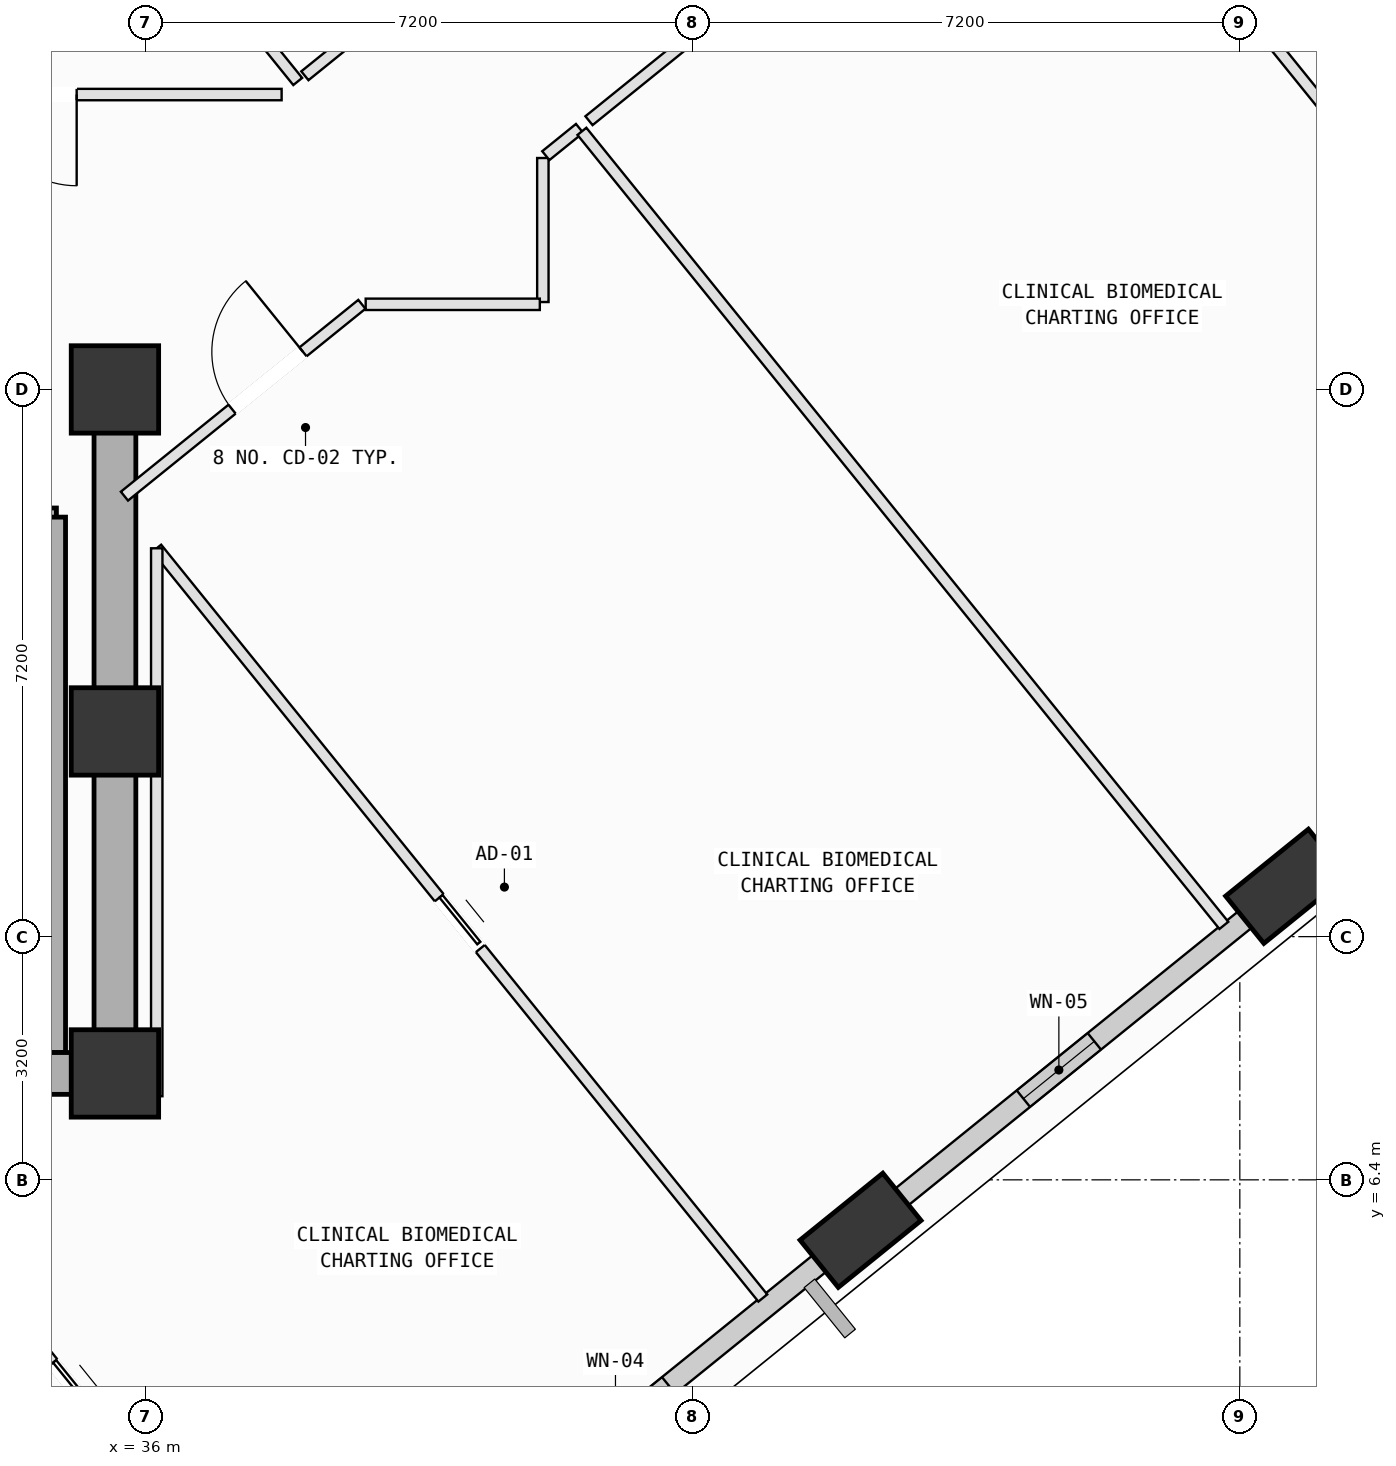
"""IFC4 building model, lengths in metres.
Left out: names, types, materials, properties, quantities, classifications, styles, units other than length and angle.
Written with IfcOpenShell. Run it as: python <this file> out.ifc"""

import sys

from ifc_helpers import new_model, si_unit, direction, frame, frame_2d, origin, origin_2d, place, context, subcontext, project, spatial, rectangle, extrude, element, fill, save


model = new_model("IFC4")
c1 = context("Model", 3, precision=1e-05, world=origin(), true_north=direction((0.0, 1.0)))
c2 = subcontext(c1, "Body", "Model", "MODEL_VIEW")
j1 = project(units=[si_unit("LENGTHUNIT", "METRE"), si_unit("PLANEANGLEUNIT", "RADIAN")], contexts=[c1])
p1 = place(None, origin())
s1 = spatial("IfcSite", under=j1, at=p1, CompositionType="ELEMENT")
p2 = place(p1, origin())
s2 = spatial("IfcBuilding", under=s1, at=p2, CompositionType="ELEMENT")
p3 = place(p2, frame((0.0, 0.0, 189.8)))
s3 = spatial("IfcBuildingStorey", under=s2, at=p3, CompositionType="ELEMENT", Elevation=189.8)
for number, where, z_axis, x_axis in (
    (1, (35.6, 7.8, 0.0), (0.0, 0.0, 1.0), (1.0, 0.0, 0.0)),
    (2, (35.6, 12.3, 0.0), (0.0, 0.0, 1.0), (1.0, 0.0, 0.0)),
    (3, (35.6, 16.8, 0.0), (0.0, 0.0, 1.0), (1.0, 0.0, 0.0)),
):
    element("IfcColumn", number, at=place(p3, frame(where, z_axis=z_axis, x_axis=x_axis)), inside=s3, PredefinedType="COLUMN", context=c2, shape_type="SweptSolid", body=[
        extrude(rectangle(XDim=1.15, YDim=1.15, at=origin_2d()), origin(), (0.0, 0.0, 1.0), 4.0),
    ])
p4 = place(p3, frame((45.41, 5.736, 0.002), z_axis=(0.078286659475, 0.049392981735, 0.995706549292), x_axis=(-0.944360032842, 0.323725114048, 0.058190883356)))
e4 = element("IfcColumn", 4, at=p4, inside=s3, PredefinedType="COLUMN", context=c2, shape_type="SweptSolid", body=[
    extrude(rectangle(XDim=1.4, YDim=0.8, at=origin_2d()), origin(), (0.0, 0.0, 1.0), 4.014),
])
p5 = place(p3, frame((51.009, 10.262, 0.002), z_axis=(0.059363348955, 0.072318669987, 0.995613380169), x_axis=(-0.998222050572, 0.009656049796, 0.058817501262)))
e5 = element("IfcColumn", 5, at=p5, inside=s3, PredefinedType="COLUMN", context=c2, shape_type="SweptSolid", body=[
    extrude(rectangle(XDim=1.4, YDim=0.8, at=origin_2d()), origin(), (0.0, 0.0, 1.0), 4.014),
])
p6 = place(p3, frame((45.168, 5.541, 0.0), z_axis=(0.0, 0.0, 1.0), x_axis=(-0.777696638223, -0.628639752877, 0.0)))
e6 = element("IfcWall", 6, at=p6, inside=s3, PredefinedType="SOLIDWALL", context=c2, shape_type="SweptSolid", body=[
    extrude(rectangle(XDim=6.214, YDim=0.28, at=frame_2d((3.107, 0.0))), origin(), (0.0, 0.0, 1.0), 3.265),
])
p7 = place(p6, frame((2.935, 0.0, 0.75)))
e7 = element("IfcOpeningElement", 7, at=p7, cuts=e6, PredefinedType="OPENING", context=c2, shape_type="SweptSolid", body=[
    extrude(rectangle(XDim=1.8, YDim=2.05, at=frame_2d((0.9, 1.025))), frame((0.0, 0.15, 0.0), z_axis=(0.0, -1.0, 0.0), x_axis=(1.0, 0.0, 0.0)), (0.0, 0.0, 1.0), 0.3),
])
p8 = place(p3, frame((50.768, 10.067, 0.0), z_axis=(0.0, 0.0, 1.0), x_axis=(-0.777701603698, -0.628633609987, 0.0)))
e8 = element("IfcWall", 8, at=p8, inside=s3, PredefinedType="SOLIDWALL", context=c2, shape_type="SweptSolid", body=[
    extrude(rectangle(XDim=6.209, YDim=0.28, at=frame_2d((3.104, 0.0))), origin(), (0.0, 0.0, 1.0), 3.265),
])
p9 = place(p8, frame((2.934, 0.0, 0.75)))
e9 = element("IfcOpeningElement", 9, at=p9, cuts=e8, PredefinedType="OPENING", context=c2, shape_type="SweptSolid", body=[
    extrude(rectangle(XDim=1.2, YDim=1.75, at=frame_2d((0.6, 0.875))), frame((0.0, 0.15, 0.0), z_axis=(0.0, -1.0, 0.0), x_axis=(1.0, 0.0, 0.0)), (0.0, 0.0, 1.0), 0.3),
])
p10 = place(p3, frame((31.37, 15.12, 0.0), z_axis=(0.0, 0.0, 1.0), x_axis=(1.0, 0.0, 0.0)))
e10 = element("IfcWall", 10, at=p10, inside=s3, PredefinedType="SOLIDWALL", context=c2, shape_type="SweptSolid", body=[
    extrude(rectangle(XDim=3.46, YDim=0.24, at=frame_2d((1.73, 0.0))), origin(), (0.0, 0.0, 1.0), 3.78),
])
p11 = place(p10, frame((2.14, 0.0, 0.0)))
e11 = element("IfcOpeningElement", 11, at=p11, cuts=e10, PredefinedType="OPENING", context=c2, shape_type="SweptSolid", body=[
    extrude(rectangle(XDim=1.1, YDim=2.15, at=frame_2d((0.55, 1.075))), frame((0.0, 0.13, 0.0), z_axis=(0.0, -1.0, 0.0), x_axis=(1.0, 0.0, 0.0)), (0.0, 0.0, 1.0), 0.26),
])
p12 = place(p3, frame((34.83, 15.12, 0.0), z_axis=(0.0, 0.0, 1.0), x_axis=(0.0, -1.0, 0.0)))
e12 = element("IfcWall", 12, at=p12, inside=s3, PredefinedType="SOLIDWALL", context=c2, shape_type="SweptSolid", body=[
    extrude(rectangle(XDim=7.045, YDim=0.24, at=frame_2d((3.522, 0.0))), origin(), (0.0, 0.0, 1.0), 3.78),
])
p13 = place(p3, frame((24.8, 7.8, 0.0), z_axis=(0.0, 0.0, 1.0), x_axis=(1.0, 0.0, 0.0)))
e13 = element("IfcWall", 13, at=p13, inside=s3, PredefinedType="SHEAR", context=c2, shape_type="SweptSolid", body=[
    extrude(rectangle(XDim=10.8, YDim=0.55, at=frame_2d((5.4, 0.0))), origin(), (0.0, 0.0, 1.0), 3.78),
])
p14 = place(p3, frame((35.6, 7.8, 0.0), z_axis=(0.0, 0.0, 1.0), x_axis=(0.0, 1.0, 0.0)))
e14 = element("IfcWall", 14, at=p14, inside=s3, PredefinedType="SHEAR", context=c2, shape_type="SweptSolid", body=[
    extrude(rectangle(XDim=9.0, YDim=0.55, at=frame_2d((4.5, 0.0))), origin(), (0.0, 0.0, 1.0), 3.78),
])
p15 = place(p3, frame((31.807, 7.675, 0.0), z_axis=(0.0, 0.0, 1.0), x_axis=(0.628606219848, -0.777723742963, 0.0)))
e15 = element("IfcWall", 15, at=p15, inside=s3, PredefinedType="PARTITIONING", context=c2, shape_type="SweptSolid", body=[
    extrude(rectangle(XDim=9.945, YDim=0.15, at=frame_2d((4.972, 0.0))), origin(), (0.0, 0.0, 1.0), 3.78),
])
p16 = place(p15, frame((4.736, 0.0, 0.0)))
e16 = element("IfcOpeningElement", 16, at=p16, cuts=e15, PredefinedType="OPENING", context=c2, shape_type="SweptSolid", body=[
    extrude(rectangle(XDim=0.86, YDim=2.06, at=frame_2d((0.43, 1.03))), frame((0.0, 0.085, 0.0), z_axis=(0.0, -1.0, 0.0), x_axis=(1.0, 0.0, 0.0)), (0.0, 0.0, 1.0), 0.17),
])
p17 = place(p3, frame((36.15, 14.71, 0.0), z_axis=(0.0, 0.0, 1.0), x_axis=(0.628634979592, -0.777700496613, 0.0)))
e17 = element("IfcWall", 17, at=p17, inside=s3, PredefinedType="PARTITIONING", context=c2, shape_type="SweptSolid", body=[
    extrude(rectangle(XDim=12.685, YDim=0.15, at=frame_2d((6.342, 0.0))), origin(), (0.0, 0.0, 1.0), 3.78),
])
p18 = place(p17, frame((5.912, 0.0, 0.0)))
e18 = element("IfcOpeningElement", 18, at=p18, cuts=e17, PredefinedType="OPENING", context=c2, shape_type="SweptSolid", body=[
    extrude(rectangle(XDim=0.86, YDim=2.06, at=frame_2d((0.43, 1.03))), frame((0.0, 0.085, 0.0), z_axis=(0.0, -1.0, 0.0), x_axis=(1.0, 0.0, 0.0)), (0.0, 0.0, 1.0), 0.17),
])
p19 = place(p3, frame((35.6, 7.5, 0.0), z_axis=(0.0, 0.0, 1.0), x_axis=(1.0, 0.0, 0.0)))
e19 = element("IfcWall", 19, at=p19, inside=s3, PredefinedType="PARTITIONING", context=c2, shape_type="SweptSolid", body=[
    extrude(rectangle(XDim=0.55, YDim=0.15, at=frame_2d((0.275, 0.0))), origin(), (0.0, 0.0, 1.0), 3.78),
])
p20 = place(p3, frame((36.15, 7.5, 0.0), z_axis=(0.0, 0.0, 1.0), x_axis=(0.0, 1.0, 0.0)))
e20 = element("IfcWall", 20, at=p20, inside=s3, PredefinedType="PARTITIONING", context=c2, shape_type="SweptSolid", body=[
    extrude(rectangle(XDim=7.21, YDim=0.15, at=frame_2d((3.605, 0.0))), origin(), (0.0, 0.0, 1.0), 3.78),
])
p21 = place(p3, frame((41.23, 17.95, 0.0), z_axis=(0.0, 0.0, 1.0), x_axis=(0.0, 1.0, 0.0)))
e21 = element("IfcWall", 21, at=p21, inside=s3, PredefinedType="PARTITIONING", context=c2, shape_type="SweptSolid", body=[
    extrude(rectangle(XDim=1.895, YDim=0.15, at=frame_2d((0.948, 0.0))), origin(), (0.0, 0.0, 1.0), 3.78),
])
p22 = place(p3, frame((41.269, 19.876, 0.0), z_axis=(0.0, 0.0, 1.0), x_axis=(0.777394219276, 0.629013694475, 0.0)))
e22 = element("IfcWall", 22, at=p22, inside=s3, PredefinedType="PARTITIONING", context=c2, shape_type="SweptSolid", body=[
    extrude(rectangle(XDim=0.571, YDim=0.15, at=frame_2d((0.286, 0.0))), origin(), (0.0, 0.0, 1.0), 3.065),
])
p23 = place(p3, frame((41.744, 20.196, 0.0), z_axis=(0.0, 0.0, 1.0), x_axis=(0.628664865479, -0.777676338146, 0.0)))
e23 = element("IfcWall", 23, at=p23, inside=s3, PredefinedType="PARTITIONING", context=c2, shape_type="SweptSolid", body=[
    extrude(rectangle(XDim=13.435, YDim=0.15, at=frame_2d((6.717, 0.0))), origin(), (0.0, 0.0, 1.0), 3.78),
])
p24 = place(p3, frame((46.084, 5.985, 0.0), z_axis=(0.0, 0.0, 1.0), x_axis=(-0.777302187171, -0.629127419382, 0.0)))
e24 = element("IfcWall", 24, at=p24, inside=s3, PredefinedType="PARTITIONING", context=c2, shape_type="SweptSolid", body=[
    extrude(rectangle(XDim=0.992, YDim=0.15, at=frame_2d((0.496, 0.0))), origin(), (0.0, 0.0, 1.0), 3.265),
])
p25 = place(p3, frame((35.725, 15.396, 0.0), z_axis=(0.0, 0.0, 1.0), x_axis=(0.777858887674, 0.628438979429, 0.0)))
e25 = element("IfcWall", 25, at=p25, inside=s3, PredefinedType="PARTITIONING", context=c2, shape_type="SweptSolid", body=[
    extrude(rectangle(XDim=4.016, YDim=0.15, at=frame_2d((2.008, 0.0))), origin(), (0.0, 0.0, 1.0), 3.78),
])
p26 = place(p25, frame((1.821, 0.0, 0.0)))
e26 = element("IfcOpeningElement", 26, at=p26, cuts=e25, PredefinedType="OPENING", context=c2, shape_type="SweptSolid", body=[
    extrude(rectangle(XDim=1.2, YDim=2.15, at=frame_2d((0.6, 1.075))), frame((0.0, 0.085, 0.0), z_axis=(0.0, -1.0, 0.0), x_axis=(1.0, 0.0, 0.0)), (0.0, 0.0, 1.0), 0.17),
])
p27 = place(p3, frame((38.899, 17.92, 0.0), z_axis=(0.0, 0.0, 1.0), x_axis=(1.0, 0.0, 0.0)))
e27 = element("IfcWall", 27, at=p27, inside=s3, PredefinedType="PARTITIONING", context=c2, shape_type="SweptSolid", body=[
    extrude(rectangle(XDim=2.291, YDim=0.15, at=frame_2d((1.146, 0.0))), origin(), (0.0, 0.0, 1.0), 3.78),
])
p28 = place(p3, frame((41.837, 20.336, 0.0), z_axis=(0.0, 0.0, 1.0), x_axis=(0.777713450533, 0.628618953628, 0.0)))
e28 = element("IfcWall", 28, at=p28, inside=s3, PredefinedType="PARTITIONING", context=c2, shape_type="SweptSolid", body=[
    extrude(rectangle(XDim=7.641, YDim=0.15, at=frame_2d((3.82, 0.0))), origin(), (0.0, 0.0, 1.0), 3.065),
])
p29 = place(p28, frame((3.22, 0.0, 0.0)))
e29 = element("IfcOpeningElement", 29, at=p29, cuts=e28, PredefinedType="OPENING", context=c2, shape_type="SweptSolid", body=[
    extrude(rectangle(XDim=1.2, YDim=2.15, at=frame_2d((0.6, 1.075))), frame((0.0, 0.085, 0.0), z_axis=(0.0, -1.0, 0.0), x_axis=(1.0, 0.0, 0.0)), (0.0, 0.0, 1.0), 0.17),
])
p30 = place(p3, frame((47.779, 25.139, 0.0), z_axis=(0.0, 0.0, 1.0), x_axis=(0.628603815075, -0.777725686649, 0.0)))
e30 = element("IfcWall", 30, at=p30, inside=s3, PredefinedType="PARTITIONING", context=c2, shape_type="SweptSolid", body=[
    extrude(rectangle(XDim=13.486, YDim=0.15, at=frame_2d((6.743, 0.0))), origin(), (0.0, 0.0, 1.0), 3.78),
])
p31 = place(p3, frame((51.682, 10.51, 0.0), z_axis=(0.0, 0.0, 1.0), x_axis=(-0.777778836383, -0.628538051095, 0.0)))
e31 = element("IfcWall", 31, at=p31, inside=s3, PredefinedType="PARTITIONING", context=c2, shape_type="SweptSolid", body=[
    extrude(rectangle(XDim=0.99, YDim=0.15, at=frame_2d((0.495, 0.0))), origin(), (0.0, 0.0, 1.0), 3.265),
])
p32 = place(p3, frame((29.437, 20.406, 0.0), z_axis=(0.0, 0.0, 1.0), x_axis=(0.777692568026, 0.628644788125, 0.0)))
e32 = element("IfcWall", 32, at=p32, inside=s3, PredefinedType="PARTITIONING", context=c2, shape_type="SweptSolid", body=[
    extrude(rectangle(XDim=6.944, YDim=0.15, at=frame_2d((3.472, 0.0))), origin(), (0.0, 0.0, 1.0), 3.78),
])
p33 = place(p3, frame((35.255, 24.254, 0.0), z_axis=(0.0, 0.0, 1.0), x_axis=(0.628661828858, -0.777678792907, 0.0)))
e33 = element("IfcWall", 33, at=p33, inside=s3, PredefinedType="PARTITIONING", context=c2, shape_type="SweptSolid", body=[
    extrude(rectangle(XDim=4.374, YDim=0.15, at=frame_2d((2.187, 0.0))), origin(), (0.0, 0.0, 1.0), 3.78),
])
p34 = place(p3, frame((37.793, 20.68, 0.0), z_axis=(0.0, 0.0, 1.0), x_axis=(-1.0, 0.0, 0.0)))
e34 = element("IfcWall", 34, at=p34, inside=s3, PredefinedType="PARTITIONING", context=c2, shape_type="SweptSolid", body=[
    extrude(rectangle(XDim=6.593, YDim=0.15, at=frame_2d((3.296, 0.0))), origin(), (0.0, 0.0, 1.0), 3.415),
])
p35 = place(p34, frame((2.697, 0.0, 0.0)))
e35 = element("IfcOpeningElement", 35, at=p35, cuts=e34, PredefinedType="OPENING", context=c2, shape_type="SweptSolid", body=[
    extrude(rectangle(XDim=1.2, YDim=2.15, at=frame_2d((0.6, 1.075))), frame((0.0, 0.085, 0.0), z_axis=(0.0, -1.0, 0.0), x_axis=(1.0, 0.0, 0.0)), (0.0, 0.0, 1.0), 0.17),
])
p36 = place(p3, frame((46.52, 27.734, 0.0), z_axis=(0.0, 0.0, 1.0), x_axis=(-0.777697805965, -0.628638308248, 0.0)))
e36 = element("IfcWall", 36, at=p36, inside=s3, PredefinedType="PARTITIONING", context=c2, shape_type="SweptSolid", body=[
    extrude(rectangle(XDim=10.828, YDim=0.15, at=frame_2d((5.414, 0.0))), origin(), (0.0, 0.0, 1.0), 3.065),
])
p37 = place(p36, frame((4.814, 0.0, 0.0)))
e37 = element("IfcOpeningElement", 37, at=p37, cuts=e36, PredefinedType="OPENING", context=c2, shape_type="SweptSolid", body=[
    extrude(rectangle(XDim=1.2, YDim=2.15, at=frame_2d((0.6, 1.075))), frame((0.0, 0.085, 0.0), z_axis=(0.0, -1.0, 0.0), x_axis=(1.0, 0.0, 0.0)), (0.0, 0.0, 1.0), 0.17),
])
p38 = place(p7, origin())
e38 = element("IfcWindow", 38, at=p38, inside=s3, PartitioningType="SINGLE_PANEL", PredefinedType="WINDOW", context=c2, shape_type="SweptSolid", body=[
    extrude(rectangle(XDim=1.8, YDim=2.05, at=frame_2d((0.9, 1.025))), frame((0.0, 0.03, 0.0), z_axis=(0.0, -1.0, 0.0), x_axis=(1.0, 0.0, 0.0)), (0.0, 0.0, 1.0), 0.06),
])
fill(e7, e38)
p39 = place(p9, origin())
e39 = element("IfcWindow", 39, at=p39, inside=s3, PartitioningType="SINGLE_PANEL", PredefinedType="WINDOW", context=c2, shape_type="SweptSolid", body=[
    extrude(rectangle(XDim=1.2, YDim=1.75, at=frame_2d((0.6, 0.875))), frame((0.0, 0.03, 0.0), z_axis=(0.0, -1.0, 0.0), x_axis=(1.0, 0.0, 0.0)), (0.0, 0.0, 1.0), 0.06),
])
fill(e9, e39)
p40 = place(p26, origin())
e40 = element("IfcDoor", 40, at=p40, inside=s3, OperationType="SINGLE_SWING_RIGHT", PredefinedType="DOOR", context=c2, shape_type="SweptSolid", body=[
    extrude(rectangle(XDim=1.2, YDim=2.15, at=frame_2d((0.6, 1.075))), frame((0.0, 0.025, 0.0), z_axis=(0.0, -1.0, 0.0), x_axis=(1.0, 0.0, 0.0)), (0.0, 0.0, 1.0), 0.05),
])
fill(e26, e40)
p41 = place(p35, origin())
e41 = element("IfcDoor", 41, at=p41, inside=s3, OperationType="SINGLE_SWING_LEFT", PredefinedType="DOOR", context=c2, shape_type="SweptSolid", body=[
    extrude(rectangle(XDim=1.2, YDim=2.15, at=frame_2d((0.6, 1.075))), frame((0.0, 0.025, 0.0), z_axis=(0.0, -1.0, 0.0), x_axis=(1.0, 0.0, 0.0)), (0.0, 0.0, 1.0), 0.05),
])
fill(e35, e41)
p42 = place(p18, origin())
e42 = element("IfcDoor", 42, at=p42, inside=s3, OperationType="SLIDING_TO_LEFT", PredefinedType="DOOR", context=c2, shape_type="SweptSolid", body=[
    extrude(rectangle(XDim=0.86, YDim=2.06, at=frame_2d((0.43, 1.03))), frame((0.0, 0.025, 0.0), z_axis=(0.0, -1.0, 0.0), x_axis=(1.0, 0.0, 0.0)), (0.0, 0.0, 1.0), 0.05),
])
fill(e18, e42)
p43 = place(p16, origin())
e43 = element("IfcDoor", 43, at=p43, inside=s3, OperationType="SLIDING_TO_LEFT", PredefinedType="DOOR", context=c2, shape_type="SweptSolid", body=[
    extrude(rectangle(XDim=0.86, YDim=2.06, at=frame_2d((0.43, 1.03))), frame((0.0, 0.025, 0.0), z_axis=(0.0, -1.0, 0.0), x_axis=(1.0, 0.0, 0.0)), (0.0, 0.0, 1.0), 0.05),
])
fill(e16, e43)
save(model, sys.argv[1])
